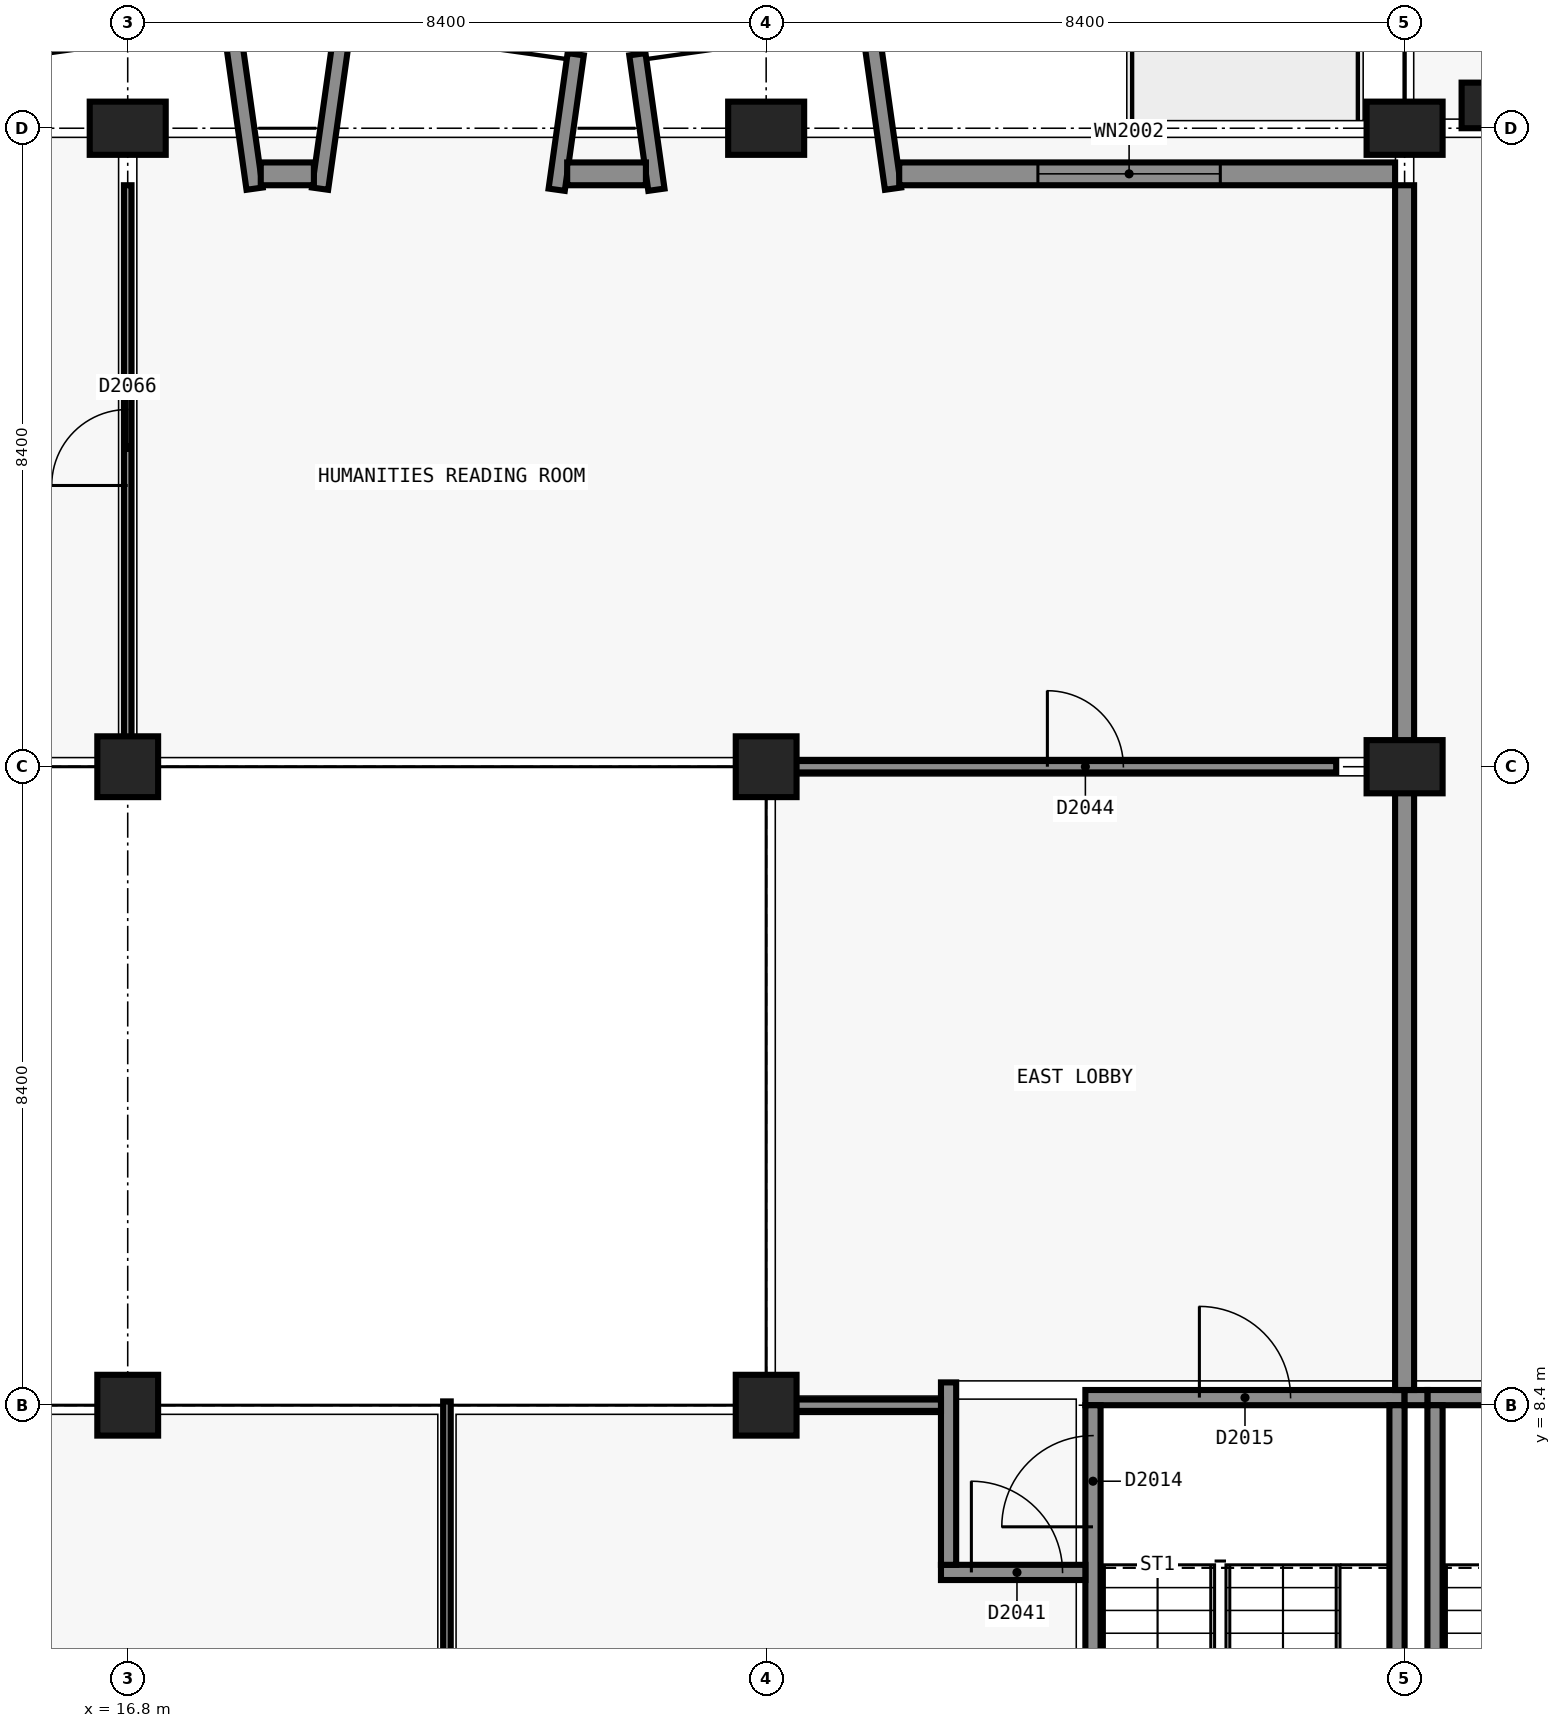
"""IFC4 building model, lengths in metres.
Left out: names, types, materials, properties, quantities, classifications, styles, units other than length and angle.
Written with IfcOpenShell. Run it as: python <this file> out.ifc"""

import sys

from ifc_helpers import new_model, si_unit, direction, frame, frame_2d, origin, origin_2d, place, context, subcontext, project, spatial, rectangle, extrude, element, fill, save


model = new_model("IFC4")
c1 = context("Model", 3, precision=1e-05, world=origin(), true_north=direction((0.0, 1.0)))
c2 = subcontext(c1, "Body", "Model", "MODEL_VIEW")
j1 = project(units=[si_unit("LENGTHUNIT", "METRE"), si_unit("PLANEANGLEUNIT", "RADIAN")], contexts=[c1])
p1 = place(None, origin())
s1 = spatial("IfcSite", under=j1, at=p1, CompositionType="ELEMENT")
p2 = place(p1, origin())
s2 = spatial("IfcBuilding", under=s1, at=p2, CompositionType="ELEMENT")
p3 = place(p2, frame((0.0, 0.0, 10.2)))
s3 = spatial("IfcBuildingStorey", under=s2, at=p3, CompositionType="ELEMENT", Elevation=10.2)
p4 = place(p3, frame((29.4, 8.5, 0.0), z_axis=(0.0, 0.0, 1.0), x_axis=(1.0, 0.0, 0.0)))
e1 = element("IfcWall", 1, at=p4, inside=s3, PredefinedType="SHEAR", context=c2, shape_type="SweptSolid", body=[
    extrude(rectangle(XDim=4.2, YDim=0.2, at=frame_2d((2.1, 0.0))), origin(), (0.0, 0.0, 1.0), 4.8),
])
p5 = place(p4, frame((1.5, 0.0, 0.0)))
e2 = element("IfcOpeningElement", 2, at=p5, cuts=e1, PredefinedType="OPENING", context=c2, shape_type="SweptSolid", body=[
    extrude(rectangle(XDim=1.2, YDim=2.1, at=frame_2d((0.6, 1.05))), frame((0.0, 0.11, 0.0), z_axis=(0.0, -1.0, 0.0), x_axis=(1.0, 0.0, 0.0)), (0.0, 0.0, 1.0), 0.22),
])
p6 = place(p3, frame((29.5, 0.2, 0.0), z_axis=(0.0, 0.0, 1.0), x_axis=(0.0, 1.0, 0.0)))
e3 = element("IfcWall", 3, at=p6, inside=s3, PredefinedType="SHEAR", context=c2, shape_type="SweptSolid", body=[
    extrude(rectangle(XDim=8.2, YDim=0.2, at=frame_2d((4.1, 0.0))), origin(), (0.0, 0.0, 1.0), 4.8),
])
p7 = place(p6, frame((6.6, 0.0, 0.0)))
e4 = element("IfcOpeningElement", 4, at=p7, cuts=e3, PredefinedType="OPENING", context=c2, shape_type="SweptSolid", body=[
    extrude(rectangle(XDim=1.2, YDim=2.1, at=frame_2d((0.6, 1.05))), frame((0.0, 0.11, 0.0), z_axis=(0.0, -1.0, 0.0), x_axis=(1.0, 0.0, 0.0)), (0.0, 0.0, 1.0), 0.22),
])
p8 = place(p3, frame((33.5, 8.4, 0.0), z_axis=(0.0, 0.0, 1.0), x_axis=(0.0, -1.0, 0.0)))
e5 = element("IfcWall", 5, at=p8, inside=s3, PredefinedType="SHEAR", context=c2, shape_type="SweptSolid", body=[
    extrude(rectangle(XDim=8.2, YDim=0.2, at=frame_2d((4.1, 0.0))), origin(), (0.0, 0.0, 1.0), 4.8),
])
p9 = place(p3, frame((33.9, 8.5, 0.0), z_axis=(0.0, 0.0, 1.0), x_axis=(1.0, 0.0, 0.0)))
e6 = element("IfcWall", 6, at=p9, inside=s3, PredefinedType="SHEAR", context=c2, shape_type="SweptSolid", body=[
    extrude(rectangle(XDim=3.9, YDim=0.2, at=frame_2d((1.95, 0.0))), origin(), (0.0, 0.0, 1.0), 4.8),
])
p10 = place(p9, frame((1.2, 0.0, 0.0)))
e7 = element("IfcOpeningElement", 7, at=p10, cuts=e6, PredefinedType="OPENING", context=c2, shape_type="SweptSolid", body=[
    extrude(rectangle(XDim=1.2, YDim=2.1, at=frame_2d((0.6, 1.05))), frame((0.0, 0.11, 0.0), z_axis=(0.0, -1.0, 0.0), x_axis=(1.0, 0.0, 0.0)), (0.0, 0.0, 1.0), 0.22),
])
p11 = place(p3, frame((34.0, 0.2, 0.0), z_axis=(0.0, 0.0, 1.0), x_axis=(0.0, 1.0, 0.0)))
e8 = element("IfcWall", 8, at=p11, inside=s3, PredefinedType="SHEAR", context=c2, shape_type="SweptSolid", body=[
    extrude(rectangle(XDim=8.2, YDim=0.2, at=frame_2d((4.1, 0.0))), origin(), (0.0, 0.0, 1.0), 4.8),
])
for number, where, z_axis, x_axis in (
    (9, (16.8, 8.4, 0.0), (0.0, 0.0, 1.0), (1.0, 0.0, 0.0)),
    (10, (16.8, 16.8, 0.0), (0.0, 0.0, 1.0), (1.0, 0.0, 0.0)),
):
    element("IfcColumn", number, at=place(p3, frame(where, z_axis=z_axis, x_axis=x_axis)), inside=s3, PredefinedType="COLUMN", context=c2, shape_type="SweptSolid", body=[
        extrude(rectangle(XDim=0.8, YDim=0.8, at=origin_2d()), origin(), (0.0, 0.0, 1.0), 4.8),
    ])
p12 = place(p3, frame((16.8, 25.2, 0.0), z_axis=(0.0, 0.0, 1.0), x_axis=(1.0, 0.0, 0.0)))
e11 = element("IfcColumn", 11, at=p12, inside=s3, PredefinedType="COLUMN", context=c2, shape_type="SweptSolid", body=[
    extrude(rectangle(XDim=1.0, YDim=0.7, at=origin_2d()), origin(), (0.0, 0.0, 1.0), 4.8),
])
for number, where, z_axis, x_axis in (
    (12, (25.2, 8.4, 0.0), (0.0, 0.0, 1.0), (1.0, 0.0, 0.0)),
    (13, (25.2, 16.8, 0.0), (0.0, 0.0, 1.0), (1.0, 0.0, 0.0)),
):
    element("IfcColumn", number, at=place(p3, frame(where, z_axis=z_axis, x_axis=x_axis)), inside=s3, PredefinedType="COLUMN", context=c2, shape_type="SweptSolid", body=[
        extrude(rectangle(XDim=0.8, YDim=0.8, at=origin_2d()), origin(), (0.0, 0.0, 1.0), 4.8),
    ])
for number, where, z_axis, x_axis in (
    (14, (25.2, 25.2, 0.0), (0.0, 0.0, 1.0), (1.0, 0.0, 0.0)),
    (15, (33.6, 16.8, 0.0), (0.0, 0.0, 1.0), (0.0, 1.0, 0.0)),
    (16, (33.6, 25.2, 0.0), (0.0, 0.0, 1.0), (1.0, 0.0, 0.0)),
):
    element("IfcColumn", number, at=place(p3, frame(where, z_axis=z_axis, x_axis=x_axis)), inside=s3, PredefinedType="COLUMN", context=c2, shape_type="SweptSolid", body=[
        extrude(rectangle(XDim=1.0, YDim=0.7, at=origin_2d()), origin(), (0.0, 0.0, 1.0), 4.8),
    ])
p13 = place(p3, frame((34.65, 25.5, 0.0), z_axis=(0.0, 0.0, 1.0), x_axis=(1.0, 0.0, 0.0)))
e17 = element("IfcColumn", 17, at=p13, inside=s3, PredefinedType="COLUMN", context=c2, shape_type="SweptSolid", body=[
    extrude(rectangle(XDim=0.6, YDim=0.6, at=origin_2d()), origin(), (0.0, 0.0, 1.0), 4.8),
])
p14 = place(p3, frame((33.6, 8.5, 0.0), z_axis=(0.0, 0.0, 1.0), x_axis=(1.0, 0.0, 0.0)))
e18 = element("IfcWall", 18, at=p14, inside=s3, PredefinedType="SHEAR", context=c2, shape_type="SweptSolid", body=[
    extrude(rectangle(XDim=0.3, YDim=0.2, at=frame_2d((0.15, 0.0))), origin(), (0.0, 0.0, 1.0), 4.8),
])
p15 = place(p3, frame((18.469, 24.405, 0.0), z_axis=(0.0, 0.0, 1.0), x_axis=(-0.139249775508, 0.99025728981, 0.0)))
e19 = element("IfcWall", 19, at=p15, inside=s3, PredefinedType="SOLIDWALL", context=c2, shape_type="SweptSolid", body=[
    extrude(rectangle(XDim=2.22, YDim=0.215, at=frame_2d((1.11, 0.0))), origin(), (0.0, 0.0, 1.0), 4.5),
])
p16 = place(p3, frame((19.331, 24.405, 0.0), z_axis=(0.0, 0.0, 1.0), x_axis=(0.139141913905, 0.990272451295, 0.0)))
e20 = element("IfcWall", 20, at=p16, inside=s3, PredefinedType="SOLIDWALL", context=c2, shape_type="SweptSolid", body=[
    extrude(rectangle(XDim=2.219, YDim=0.215, at=frame_2d((1.11, 0.0))), origin(), (0.0, 0.0, 1.0), 4.5),
])
for number, where, z_axis, x_axis in (
    (21, (22.444, 24.391, 0.0), (0.0, 0.0, 1.0), (0.139, 0.99, 0.0)),
    (22, (23.756, 24.391, 0.0), (0.0, 0.0, 1.0), (-0.139, 0.99, 0.0)),
):
    element("IfcWall", number, at=place(p3, frame(where, z_axis=z_axis, x_axis=x_axis)), inside=s3, PredefinedType="SOLIDWALL", context=c2, shape_type="SweptSolid", body=[
        extrude(rectangle(XDim=1.8, YDim=0.215, at=frame_2d((0.9, 0.0))), origin(), (0.0, 0.0, 1.0), 4.5),
    ])
p17 = place(p3, frame((26.869, 24.405, 0.0), z_axis=(0.0, 0.0, 1.0), x_axis=(-0.139141913905, 0.990272451295, 0.0)))
e23 = element("IfcWall", 23, at=p17, inside=s3, PredefinedType="SOLIDWALL", context=c2, shape_type="SweptSolid", body=[
    extrude(rectangle(XDim=2.219, YDim=0.215, at=frame_2d((1.11, 0.0))), origin(), (0.0, 0.0, 1.0), 4.5),
])
p18 = place(p3, frame((18.551, 24.6, 0.0), z_axis=(0.0, 0.0, 1.0), x_axis=(1.0, 0.0, 0.0)))
e24 = element("IfcWall", 24, at=p18, inside=s3, PredefinedType="SOLIDWALL", context=c2, shape_type="SweptSolid", body=[
    extrude(rectangle(XDim=0.699, YDim=0.3, at=frame_2d((0.35, 0.0))), origin(), (0.0, 0.0, 1.0), 4.5),
])
p19 = place(p3, frame((22.582, 24.6, 0.0), z_axis=(0.0, 0.0, 1.0), x_axis=(1.0, 0.0, 0.0)))
e25 = element("IfcWall", 25, at=p19, inside=s3, PredefinedType="SOLIDWALL", context=c2, shape_type="SweptSolid", body=[
    extrude(rectangle(XDim=1.036, YDim=0.3, at=frame_2d((0.518, 0.0))), origin(), (0.0, 0.0, 1.0), 4.5),
])
p20 = place(p3, frame((26.95, 24.6, 0.0), z_axis=(0.0, 0.0, 1.0), x_axis=(1.0, 0.0, 0.0)))
e26 = element("IfcWall", 26, at=p20, inside=s3, PredefinedType="SOLIDWALL", context=c2, shape_type="SweptSolid", body=[
    extrude(rectangle(XDim=6.525, YDim=0.3, at=frame_2d((3.262, 0.0))), origin(), (0.0, 0.0, 1.0), 4.5),
])
p21 = place(p20, frame((1.825, 0.0, 0.9)))
e27 = element("IfcOpeningElement", 27, at=p21, cuts=e26, PredefinedType="OPENING", context=c2, shape_type="SweptSolid", body=[
    extrude(rectangle(XDim=2.4, YDim=1.5, at=frame_2d((1.2, 0.75))), frame((0.0, 0.16, 0.0), z_axis=(0.0, -1.0, 0.0), x_axis=(1.0, 0.0, 0.0)), (0.0, 0.0, 1.0), 0.32),
])
p22 = place(p3, frame((33.6, 8.6, 0.0), z_axis=(0.0, 0.0, 1.0), x_axis=(0.0, 1.0, 0.0)))
e28 = element("IfcWall", 28, at=p22, inside=s3, PredefinedType="SOLIDWALL", context=c2, shape_type="SweptSolid", body=[
    extrude(rectangle(XDim=15.85, YDim=0.25, at=frame_2d((7.925, 0.0))), origin(), (0.0, 0.0, 1.0), 3.8),
])
p23 = place(p3, frame((27.5, 6.2, 0.0), z_axis=(0.0, 0.0, 1.0), x_axis=(1.0, 0.0, 0.0)))
e29 = element("IfcWall", 29, at=p23, inside=s3, PredefinedType="SOLIDWALL", context=c2, shape_type="SweptSolid", body=[
    extrude(rectangle(XDim=1.9, YDim=0.2, at=frame_2d((0.95, 0.0))), origin(), (0.0, 0.0, 1.0), 4.5),
])
p24 = place(p23, frame((0.4, 0.0, 0.0)))
e30 = element("IfcOpeningElement", 30, at=p24, cuts=e29, PredefinedType="OPENING", context=c2, shape_type="SweptSolid", body=[
    extrude(rectangle(XDim=1.2, YDim=2.1, at=frame_2d((0.6, 1.05))), frame((0.0, 0.11, 0.0), z_axis=(0.0, -1.0, 0.0), x_axis=(1.0, 0.0, 0.0)), (0.0, 0.0, 1.0), 0.22),
])
p25 = place(p3, frame((27.6, 6.3, 0.0), z_axis=(0.0, 0.0, 1.0), x_axis=(0.0, 1.0, 0.0)))
e31 = element("IfcWall", 31, at=p25, inside=s3, PredefinedType="SOLIDWALL", context=c2, shape_type="SweptSolid", body=[
    extrude(rectangle(XDim=2.4, YDim=0.2, at=frame_2d((1.2, 0.0))), origin(), (0.0, 0.0, 1.0), 4.0),
])
p26 = place(p3, frame((25.125, 8.4, 0.0), z_axis=(0.0, 0.0, 1.0), x_axis=(1.0, 0.0, 0.0)))
e32 = element("IfcWall", 32, at=p26, inside=s3, PredefinedType="PARTITIONING", context=c2, shape_type="SweptSolid", body=[
    extrude(rectangle(XDim=2.375, YDim=0.15, at=frame_2d((1.188, 0.0))), origin(), (0.0, 0.0, 1.0), 3.8),
])
p27 = place(p3, frame((25.125, 16.8, 0.0), z_axis=(0.0, 0.0, 1.0), x_axis=(1.0, 0.0, 0.0)))
e33 = element("IfcWall", 33, at=p27, inside=s3, PredefinedType="PARTITIONING", context=c2, shape_type="SweptSolid", body=[
    extrude(rectangle(XDim=7.575, YDim=0.15, at=frame_2d((3.788, 0.0))), origin(), (0.0, 0.0, 1.0), 3.8),
])
p28 = place(p27, frame((3.775, 0.0, 0.0)))
e34 = element("IfcOpeningElement", 34, at=p28, cuts=e33, PredefinedType="OPENING", context=c2, shape_type="SweptSolid", body=[
    extrude(rectangle(XDim=1.0, YDim=2.1, at=frame_2d((0.5, 1.05))), frame((0.0, 0.085, 0.0), z_axis=(0.0, -1.0, 0.0), x_axis=(1.0, 0.0, 0.0)), (0.0, 0.0, 1.0), 0.17),
])
p29 = place(p3, frame((16.8, 16.75, 0.0), z_axis=(0.0, 0.0, 1.0), x_axis=(0.0, 1.0, 0.0)))
e35 = element("IfcWall", 35, at=p29, inside=s3, PredefinedType="PARTITIONING", context=c2, shape_type="SweptSolid", body=[
    extrude(rectangle(XDim=7.7, YDim=0.1, at=frame_2d((3.85, 0.0))), origin(), (0.0, 0.0, 1.0), 3.8),
])
p30 = place(p29, frame((3.75, 0.0, 0.0)))
e36 = element("IfcOpeningElement", 36, at=p30, cuts=e35, PredefinedType="OPENING", context=c2, shape_type="SweptSolid", body=[
    extrude(rectangle(XDim=1.0, YDim=2.1, at=frame_2d((0.5, 1.05))), frame((0.0, 0.06, 0.0), z_axis=(0.0, -1.0, 0.0), x_axis=(1.0, 0.0, 0.0)), (0.0, 0.0, 1.0), 0.12),
])
p31 = place(p3, frame((21.0, 0.75, 0.0), z_axis=(0.0, 0.0, 1.0), x_axis=(0.0, 1.0, 0.0)))
e37 = element("IfcWall", 37, at=p31, inside=s3, PredefinedType="PARTITIONING", context=c2, shape_type="SweptSolid", body=[
    extrude(rectangle(XDim=7.7, YDim=0.1, at=frame_2d((3.85, 0.0))), origin(), (0.0, 0.0, 1.0), 3.8),
])
p32 = place(p31, frame((2.95, 0.0, 0.0)))
e38 = element("IfcOpeningElement", 38, at=p32, cuts=e37, PredefinedType="OPENING", context=c2, shape_type="SweptSolid", body=[
    extrude(rectangle(XDim=1.0, YDim=2.1, at=frame_2d((0.5, 1.05))), frame((0.0, 0.06, 0.0), z_axis=(0.0, -1.0, 0.0), x_axis=(1.0, 0.0, 0.0)), (0.0, 0.0, 1.0), 0.12),
])
p33 = place(p21, origin())
e39 = element("IfcWindow", 39, at=p33, inside=s3, PartitioningType="SINGLE_PANEL", PredefinedType="WINDOW", context=c2, shape_type="SweptSolid", body=[
    extrude(rectangle(XDim=2.4, YDim=1.5, at=frame_2d((1.2, 0.75))), frame((0.0, 0.03, 0.0), z_axis=(0.0, -1.0, 0.0), x_axis=(1.0, 0.0, 0.0)), (0.0, 0.0, 1.0), 0.06),
])
fill(e27, e39)
p34 = place(p7, origin())
e40 = element("IfcDoor", 40, at=p34, inside=s3, OperationType="SINGLE_SWING_RIGHT", PredefinedType="DOOR", context=c2, shape_type="SweptSolid", body=[
    extrude(rectangle(XDim=1.2, YDim=2.1, at=frame_2d((0.6, 1.05))), frame((0.0, 0.025, 0.0), z_axis=(0.0, -1.0, 0.0), x_axis=(1.0, 0.0, 0.0)), (0.0, 0.0, 1.0), 0.05),
])
fill(e4, e40)
p35 = place(p5, origin())
e41 = element("IfcDoor", 41, at=p35, inside=s3, OperationType="SINGLE_SWING_RIGHT", PredefinedType="DOOR", context=c2, shape_type="SweptSolid", body=[
    extrude(rectangle(XDim=1.2, YDim=2.1, at=frame_2d((0.6, 1.05))), frame((0.0, 0.025, 0.0), z_axis=(0.0, -1.0, 0.0), x_axis=(1.0, 0.0, 0.0)), (0.0, 0.0, 1.0), 0.05),
])
fill(e2, e41)
p36 = place(p24, origin())
e42 = element("IfcDoor", 42, at=p36, inside=s3, OperationType="SINGLE_SWING_RIGHT", PredefinedType="DOOR", context=c2, shape_type="SweptSolid", body=[
    extrude(rectangle(XDim=1.2, YDim=2.1, at=frame_2d((0.6, 1.05))), frame((0.0, 0.025, 0.0), z_axis=(0.0, -1.0, 0.0), x_axis=(1.0, 0.0, 0.0)), (0.0, 0.0, 1.0), 0.05),
])
fill(e30, e42)
p37 = place(p28, origin())
e43 = element("IfcDoor", 43, at=p37, inside=s3, OperationType="SINGLE_SWING_LEFT", PredefinedType="DOOR", context=c2, shape_type="SweptSolid", body=[
    extrude(rectangle(XDim=1.0, YDim=2.1, at=frame_2d((0.5, 1.05))), frame((0.0, 0.025, 0.0), z_axis=(0.0, -1.0, 0.0), x_axis=(1.0, 0.0, 0.0)), (0.0, 0.0, 1.0), 0.05),
])
fill(e34, e43)
p38 = place(p30, origin())
e44 = element("IfcDoor", 44, at=p38, inside=s3, OperationType="SINGLE_SWING_RIGHT", PredefinedType="DOOR", context=c2, shape_type="SweptSolid", body=[
    extrude(rectangle(XDim=1.0, YDim=2.1, at=frame_2d((0.5, 1.05))), frame((0.0, 0.025, 0.0), z_axis=(0.0, -1.0, 0.0), x_axis=(1.0, 0.0, 0.0)), (0.0, 0.0, 1.0), 0.05),
])
fill(e36, e44)
save(model, sys.argv[1])
